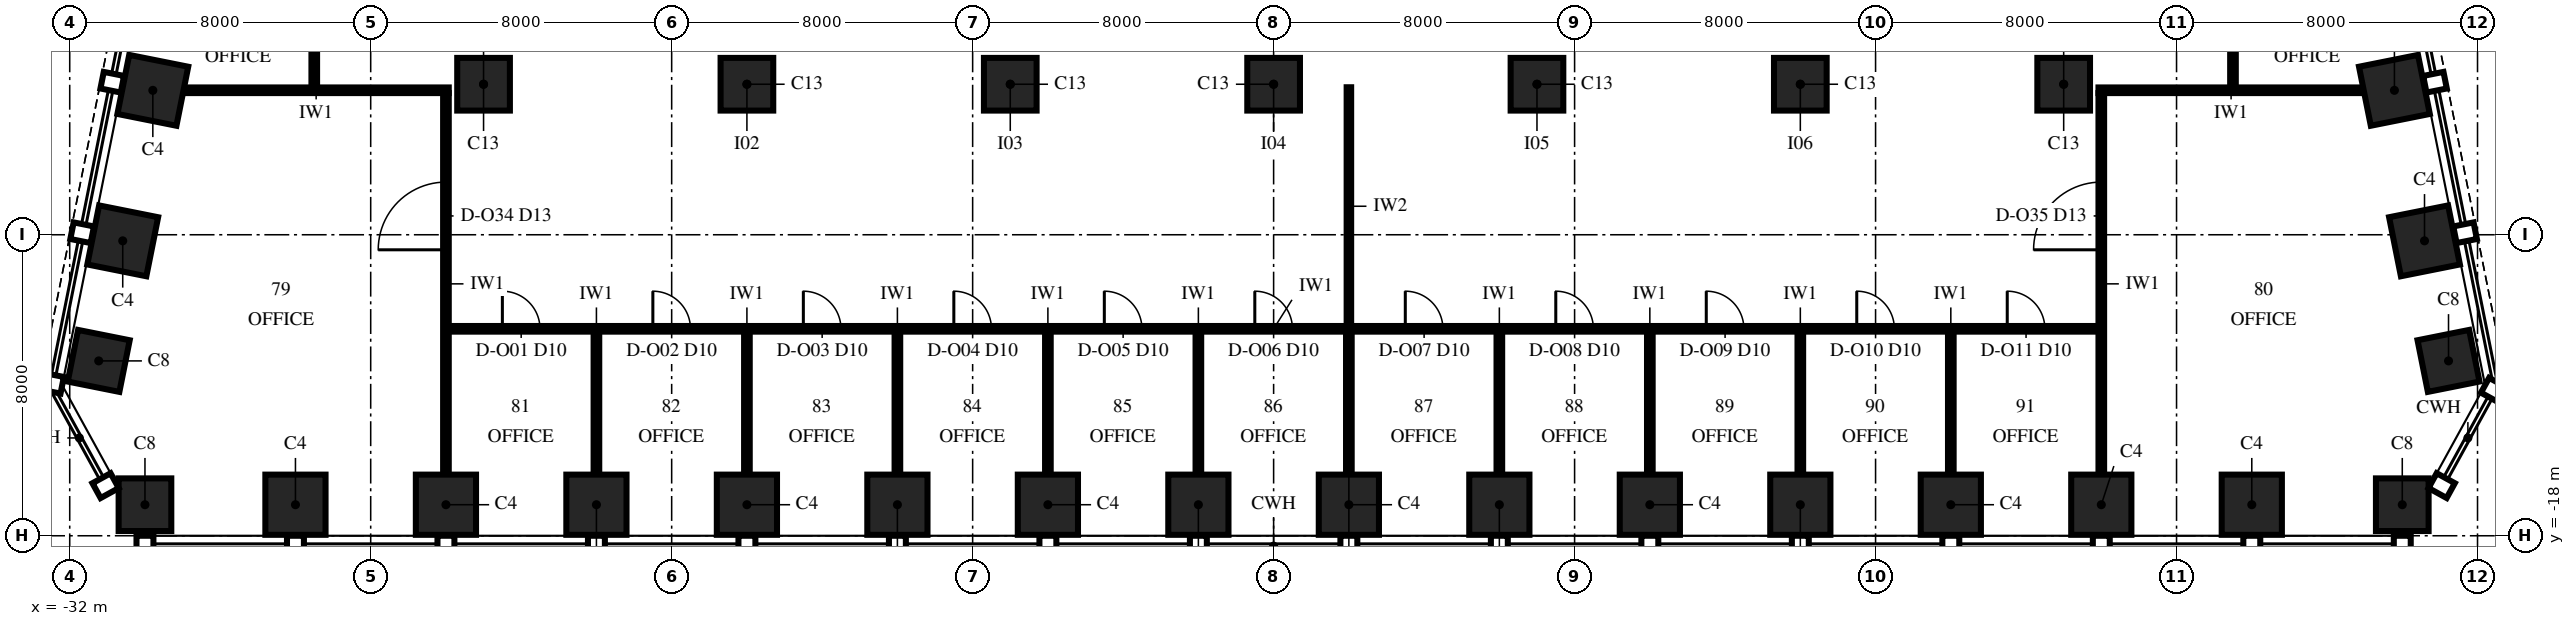
"""IFC4 building model, lengths in metres.
Left out: names, types, materials, properties, quantities, classifications, styles, units other than length and angle.
Written with IfcOpenShell. Run it as: python <this file> out.ifc"""

import sys

from ifc_helpers import new_model, si_unit, direction, frame, frame_2d, origin, origin_2d, place, context, subcontext, project, spatial, rectangle, extrude, element, fill, save


model = new_model("IFC4")
c1 = context("Model", 3, precision=1e-05, world=origin(), true_north=direction((0.0, 1.0)))
c2 = subcontext(c1, "Body", "Model", "MODEL_VIEW")
j1 = project(units=[si_unit("LENGTHUNIT", "METRE"), si_unit("PLANEANGLEUNIT", "RADIAN")], contexts=[c1])
p1 = place(None, origin())
s1 = spatial("IfcSite", under=j1, at=p1, CompositionType="ELEMENT")
p2 = place(p1, origin())
s2 = spatial("IfcBuilding", under=s1, at=p2, CompositionType="ELEMENT")
p3 = place(p2, frame((0.0, 0.0, 202.0)))
s3 = spatial("IfcBuildingStorey", under=s2, at=p3, CompositionType="ELEMENT", Elevation=202.0)
p4 = place(p3, frame((-30.0, -17.175, 0.0), z_axis=(0.0, 0.0, 1.0), x_axis=(1.0, 0.0, 0.0)))
e1 = element("IfcColumn", 1, at=p4, inside=s3, PredefinedType="COLUMN", context=c2, shape_type="SweptSolid", body=[
    extrude(rectangle(XDim=1.4, YDim=1.4, at=origin_2d()), origin(), (0.0, 0.0, 1.0), 4.0),
])
for number, where, z_axis, x_axis in (
    (2, (-26.0, -17.175, 0.0), (0.0, 0.0, 1.0), (1.0, 0.0, 0.0)),
    (3, (-22.0, -17.175, 0.0), (0.0, 0.0, 1.0), (1.0, 0.0, 0.0)),
    (4, (-18.0, -17.175, 0.0), (0.0, 0.0, 1.0), (1.0, 0.0, 0.0)),
    (5, (-14.0, -17.175, 0.0), (0.0, 0.0, 1.0), (1.0, 0.0, 0.0)),
    (6, (-10.0, -17.175, 0.0), (0.0, 0.0, 1.0), (1.0, 0.0, 0.0)),
    (7, (-6.0, -17.175, 0.0), (0.0, 0.0, 1.0), (1.0, 0.0, 0.0)),
    (8, (-2.0, -17.175, 0.0), (0.0, 0.0, 1.0), (1.0, 0.0, 0.0)),
    (9, (2.0, -17.175, 0.0), (0.0, 0.0, 1.0), (1.0, 0.0, 0.0)),
    (10, (6.0, -17.175, 0.0), (0.0, 0.0, 1.0), (1.0, 0.0, 0.0)),
    (11, (10.0, -17.175, 0.0), (0.0, 0.0, 1.0), (1.0, 0.0, 0.0)),
    (12, (14.0, -17.175, 0.0), (0.0, 0.0, 1.0), (1.0, 0.0, 0.0)),
    (13, (18.0, -17.175, 0.0), (0.0, 0.0, 1.0), (1.0, 0.0, 0.0)),
    (14, (22.0, -17.175, 0.0), (0.0, 0.0, 1.0), (1.0, 0.0, 0.0)),
    (15, (26.0, -17.175, 0.0), (0.0, 0.0, 1.0), (1.0, 0.0, 0.0)),
):
    element("IfcColumn", number, at=place(p3, frame(where, z_axis=z_axis, x_axis=x_axis)), inside=s3, PredefinedType="COLUMN", context=c2, shape_type="SweptSolid", body=[
        extrude(rectangle(XDim=1.6, YDim=1.6, at=origin_2d()), origin(), (0.0, 0.0, 1.0), 4.0),
    ])
for number, where, z_axis, x_axis in (
    (16, (30.0, -17.175, 0.0), (0.0, 0.0, 1.0), (1.0, 0.0, 0.0)),
    (17, (31.229, -13.353, 0.0), (0.0, 0.0, 1.0), (-0.196, 0.981, 0.0)),
):
    element("IfcColumn", number, at=place(p3, frame(where, z_axis=z_axis, x_axis=x_axis)), inside=s3, PredefinedType="COLUMN", context=c2, shape_type="SweptSolid", body=[
        extrude(rectangle(XDim=1.4, YDim=1.4, at=origin_2d()), origin(), (0.0, 0.0, 1.0), 4.0),
    ])
for number, where, z_axis, x_axis in (
    (18, (30.591, -10.162, 0.0), (0.0, 0.0, 1.0), (-0.196, 0.981, 0.0)),
    (19, (29.791, -6.162, 0.0), (0.0, 0.0, 1.0), (-0.196, 0.981, 0.0)),
    (20, (-29.791, -6.162, 0.0), (0.0, 0.0, 1.0), (-0.196, -0.981, 0.0)),
    (21, (-30.591, -10.162, 0.0), (0.0, 0.0, 1.0), (-0.196, -0.981, 0.0)),
):
    element("IfcColumn", number, at=place(p3, frame(where, z_axis=z_axis, x_axis=x_axis)), inside=s3, PredefinedType="COLUMN", context=c2, shape_type="SweptSolid", body=[
        extrude(rectangle(XDim=1.6, YDim=1.6, at=origin_2d()), origin(), (0.0, 0.0, 1.0), 4.0),
    ])
for number, where, z_axis, x_axis in (
    (22, (-31.229, -13.353, 0.0), (0.0, 0.0, 1.0), (-0.196, -0.981, 0.0)),
    (23, (-21.0, -6.0, 0.0), (0.0, 0.0, 1.0), (1.0, 0.0, 0.0)),
    (24, (-14.0, -6.0, 0.0), (0.0, 0.0, 1.0), (1.0, 0.0, 0.0)),
    (25, (-7.0, -6.0, 0.0), (0.0, 0.0, 1.0), (1.0, 0.0, 0.0)),
    (26, (0.0, -6.0, 0.0), (0.0, 0.0, 1.0), (1.0, 0.0, 0.0)),
    (27, (7.0, -6.0, 0.0), (0.0, 0.0, 1.0), (1.0, 0.0, 0.0)),
    (28, (14.0, -6.0, 0.0), (0.0, 0.0, 1.0), (1.0, 0.0, 0.0)),
    (29, (21.0, -6.0, 0.0), (0.0, 0.0, 1.0), (1.0, 0.0, 0.0)),
):
    element("IfcColumn", number, at=place(p3, frame(where, z_axis=z_axis, x_axis=x_axis)), inside=s3, PredefinedType="COLUMN", context=c2, shape_type="SweptSolid", body=[
        extrude(rectangle(XDim=1.4, YDim=1.4, at=origin_2d()), origin(), (0.0, 0.0, 1.0), 4.0),
    ])
p5 = place(p3, frame((-21.925, -12.5, 0.0), z_axis=(0.0, 0.0, 1.0), x_axis=(1.0, 0.0, 0.0)))
e30 = element("IfcWall", 30, at=p5, inside=s3, PredefinedType="PARTITIONING", context=c2, shape_type="SweptSolid", body=[
    extrude(rectangle(XDim=43.85, YDim=0.15, at=frame_2d((21.925, 0.0))), origin(), (0.0, 0.0, 1.0), 3.25),
])
p6 = place(p5, frame((1.425, 0.0, 0.0)))
e31 = element("IfcOpeningElement", 31, at=p6, cuts=e30, PredefinedType="OPENING", context=c2, shape_type="SweptSolid", body=[
    extrude(rectangle(XDim=1.0, YDim=2.3, at=frame_2d((0.5, 1.15))), frame((0.0, 0.09, 0.0), z_axis=(0.0, -1.0, 0.0), x_axis=(1.0, 0.0, 0.0)), (0.0, 0.0, 1.0), 0.18),
])
p7 = place(p5, frame((5.425, 0.0, 0.0)))
e32 = element("IfcOpeningElement", 32, at=p7, cuts=e30, PredefinedType="OPENING", context=c2, shape_type="SweptSolid", body=[
    extrude(rectangle(XDim=1.0, YDim=2.3, at=frame_2d((0.5, 1.15))), frame((0.0, 0.09, 0.0), z_axis=(0.0, -1.0, 0.0), x_axis=(1.0, 0.0, 0.0)), (0.0, 0.0, 1.0), 0.18),
])
p8 = place(p5, frame((9.425, 0.0, 0.0)))
e33 = element("IfcOpeningElement", 33, at=p8, cuts=e30, PredefinedType="OPENING", context=c2, shape_type="SweptSolid", body=[
    extrude(rectangle(XDim=1.0, YDim=2.3, at=frame_2d((0.5, 1.15))), frame((0.0, 0.09, 0.0), z_axis=(0.0, -1.0, 0.0), x_axis=(1.0, 0.0, 0.0)), (0.0, 0.0, 1.0), 0.18),
])
p9 = place(p5, frame((13.425, 0.0, 0.0)))
e34 = element("IfcOpeningElement", 34, at=p9, cuts=e30, PredefinedType="OPENING", context=c2, shape_type="SweptSolid", body=[
    extrude(rectangle(XDim=1.0, YDim=2.3, at=frame_2d((0.5, 1.15))), frame((0.0, 0.09, 0.0), z_axis=(0.0, -1.0, 0.0), x_axis=(1.0, 0.0, 0.0)), (0.0, 0.0, 1.0), 0.18),
])
p10 = place(p5, frame((17.425, 0.0, 0.0)))
e35 = element("IfcOpeningElement", 35, at=p10, cuts=e30, PredefinedType="OPENING", context=c2, shape_type="SweptSolid", body=[
    extrude(rectangle(XDim=1.0, YDim=2.3, at=frame_2d((0.5, 1.15))), frame((0.0, 0.09, 0.0), z_axis=(0.0, -1.0, 0.0), x_axis=(1.0, 0.0, 0.0)), (0.0, 0.0, 1.0), 0.18),
])
p11 = place(p5, frame((21.425, 0.0, 0.0)))
e36 = element("IfcOpeningElement", 36, at=p11, cuts=e30, PredefinedType="OPENING", context=c2, shape_type="SweptSolid", body=[
    extrude(rectangle(XDim=1.0, YDim=2.3, at=frame_2d((0.5, 1.15))), frame((0.0, 0.09, 0.0), z_axis=(0.0, -1.0, 0.0), x_axis=(1.0, 0.0, 0.0)), (0.0, 0.0, 1.0), 0.18),
])
p12 = place(p5, frame((25.425, 0.0, 0.0)))
e37 = element("IfcOpeningElement", 37, at=p12, cuts=e30, PredefinedType="OPENING", context=c2, shape_type="SweptSolid", body=[
    extrude(rectangle(XDim=1.0, YDim=2.3, at=frame_2d((0.5, 1.15))), frame((0.0, 0.09, 0.0), z_axis=(0.0, -1.0, 0.0), x_axis=(1.0, 0.0, 0.0)), (0.0, 0.0, 1.0), 0.18),
])
p13 = place(p5, frame((29.425, 0.0, 0.0)))
e38 = element("IfcOpeningElement", 38, at=p13, cuts=e30, PredefinedType="OPENING", context=c2, shape_type="SweptSolid", body=[
    extrude(rectangle(XDim=1.0, YDim=2.3, at=frame_2d((0.5, 1.15))), frame((0.0, 0.09, 0.0), z_axis=(0.0, -1.0, 0.0), x_axis=(1.0, 0.0, 0.0)), (0.0, 0.0, 1.0), 0.18),
])
p14 = place(p5, frame((33.425, 0.0, 0.0)))
e39 = element("IfcOpeningElement", 39, at=p14, cuts=e30, PredefinedType="OPENING", context=c2, shape_type="SweptSolid", body=[
    extrude(rectangle(XDim=1.0, YDim=2.3, at=frame_2d((0.5, 1.15))), frame((0.0, 0.09, 0.0), z_axis=(0.0, -1.0, 0.0), x_axis=(1.0, 0.0, 0.0)), (0.0, 0.0, 1.0), 0.18),
])
p15 = place(p5, frame((37.425, 0.0, 0.0)))
e40 = element("IfcOpeningElement", 40, at=p15, cuts=e30, PredefinedType="OPENING", context=c2, shape_type="SweptSolid", body=[
    extrude(rectangle(XDim=1.0, YDim=2.3, at=frame_2d((0.5, 1.15))), frame((0.0, 0.09, 0.0), z_axis=(0.0, -1.0, 0.0), x_axis=(1.0, 0.0, 0.0)), (0.0, 0.0, 1.0), 0.18),
])
p16 = place(p5, frame((41.425, 0.0, 0.0)))
e41 = element("IfcOpeningElement", 41, at=p16, cuts=e30, PredefinedType="OPENING", context=c2, shape_type="SweptSolid", body=[
    extrude(rectangle(XDim=1.0, YDim=2.3, at=frame_2d((0.5, 1.15))), frame((0.0, 0.09, 0.0), z_axis=(0.0, -1.0, 0.0), x_axis=(1.0, 0.0, 0.0)), (0.0, 0.0, 1.0), 0.18),
])
for number, where, z_axis, x_axis in (
    (42, (-28.975, -6.16, 0.0), (0.0, 0.0, 1.0), (1.0, 0.0, 0.0)),
    (43, (21.925, -6.16, 0.0), (0.0, 0.0, 1.0), (1.0, 0.0, 0.0)),
):
    element("IfcWall", number, at=place(p3, frame(where, z_axis=z_axis, x_axis=x_axis)), inside=s3, PredefinedType="PARTITIONING", context=c2, shape_type="SweptSolid", body=[
        extrude(rectangle(XDim=7.05, YDim=0.15, at=frame_2d((3.525, 0.0))), origin(), (0.0, 0.0, 1.0), 2.842),
    ])
p17 = place(p3, frame((-25.5, -6.085, 0.0), z_axis=(0.0, 0.0, 1.0), x_axis=(0.0, 1.0, 0.0)))
e44 = element("IfcWall", 44, at=p17, inside=s3, PredefinedType="PARTITIONING", context=c2, shape_type="SweptSolid", body=[
    extrude(rectangle(XDim=3.85, YDim=0.15, at=frame_2d((1.925, 0.0))), origin(), (0.0, 0.0, 1.0), 2.842),
])
p18 = place(p17, frame((1.425, 0.0, 0.0)))
e45 = element("IfcOpeningElement", 45, at=p18, cuts=e44, PredefinedType="OPENING", context=c2, shape_type="SweptSolid", body=[
    extrude(rectangle(XDim=1.0, YDim=2.3, at=frame_2d((0.5, 1.15))), frame((0.0, 0.09, 0.0), z_axis=(0.0, -1.0, 0.0), x_axis=(1.0, 0.0, 0.0)), (0.0, 0.0, 1.0), 0.18),
])
p19 = place(p3, frame((-22.0, -16.375, 0.0), z_axis=(0.0, 0.0, 1.0), x_axis=(0.0, 1.0, 0.0)))
e46 = element("IfcWall", 46, at=p19, inside=s3, PredefinedType="PARTITIONING", context=c2, shape_type="SweptSolid", body=[
    extrude(rectangle(XDim=10.14, YDim=0.15, at=frame_2d((5.07, 0.0))), origin(), (0.0, 0.0, 1.0), 3.25),
])
p20 = place(p19, frame((5.975, 0.0, 0.0)))
e47 = element("IfcOpeningElement", 47, at=p20, cuts=e46, PredefinedType="OPENING", context=c2, shape_type="SweptSolid", body=[
    extrude(rectangle(XDim=1.8, YDim=2.4, at=frame_2d((0.9, 1.2))), frame((0.0, 0.09, 0.0), z_axis=(0.0, -1.0, 0.0), x_axis=(1.0, 0.0, 0.0)), (0.0, 0.0, 1.0), 0.18),
])
for number, where, z_axis, x_axis in (
    (48, (-18.0, -16.375, 0.0), (0.0, 0.0, 1.0), (0.0, 1.0, 0.0)),
    (49, (-14.0, -16.375, 0.0), (0.0, 0.0, 1.0), (0.0, 1.0, 0.0)),
    (50, (-10.0, -16.375, 0.0), (0.0, 0.0, 1.0), (0.0, 1.0, 0.0)),
    (51, (-6.0, -16.375, 0.0), (0.0, 0.0, 1.0), (0.0, 1.0, 0.0)),
    (52, (-2.0, -16.375, 0.0), (0.0, 0.0, 1.0), (0.0, 1.0, 0.0)),
    (53, (2.0, -16.375, 0.0), (0.0, 0.0, 1.0), (0.0, 1.0, 0.0)),
    (54, (6.0, -16.375, 0.0), (0.0, 0.0, 1.0), (0.0, 1.0, 0.0)),
    (55, (10.0, -16.375, 0.0), (0.0, 0.0, 1.0), (0.0, 1.0, 0.0)),
    (56, (14.0, -16.375, 0.0), (0.0, 0.0, 1.0), (0.0, 1.0, 0.0)),
    (57, (18.0, -16.375, 0.0), (0.0, 0.0, 1.0), (0.0, 1.0, 0.0)),
):
    element("IfcWall", number, at=place(p3, frame(where, z_axis=z_axis, x_axis=x_axis)), inside=s3, PredefinedType="PARTITIONING", context=c2, shape_type="SweptSolid", body=[
        extrude(rectangle(XDim=3.8, YDim=0.15, at=frame_2d((1.9, 0.0))), origin(), (0.0, 0.0, 1.0), 3.25),
    ])
p21 = place(p3, frame((22.0, -16.375, 0.0), z_axis=(0.0, 0.0, 1.0), x_axis=(0.0, 1.0, 0.0)))
e58 = element("IfcWall", 58, at=p21, inside=s3, PredefinedType="PARTITIONING", context=c2, shape_type="SweptSolid", body=[
    extrude(rectangle(XDim=10.14, YDim=0.15, at=frame_2d((5.07, 0.0))), origin(), (0.0, 0.0, 1.0), 3.25),
])
p22 = place(p21, frame((5.975, 0.0, 0.0)))
e59 = element("IfcOpeningElement", 59, at=p22, cuts=e58, PredefinedType="OPENING", context=c2, shape_type="SweptSolid", body=[
    extrude(rectangle(XDim=1.8, YDim=2.4, at=frame_2d((0.9, 1.2))), frame((0.0, 0.09, 0.0), z_axis=(0.0, -1.0, 0.0), x_axis=(1.0, 0.0, 0.0)), (0.0, 0.0, 1.0), 0.18),
])
p23 = place(p3, frame((25.5, -6.085, 0.0), z_axis=(0.0, 0.0, 1.0), x_axis=(0.0, 1.0, 0.0)))
e60 = element("IfcWall", 60, at=p23, inside=s3, PredefinedType="PARTITIONING", context=c2, shape_type="SweptSolid", body=[
    extrude(rectangle(XDim=3.85, YDim=0.15, at=frame_2d((1.925, 0.0))), origin(), (0.0, 0.0, 1.0), 2.842),
])
p24 = place(p23, frame((1.425, 0.0, 0.0)))
e61 = element("IfcOpeningElement", 61, at=p24, cuts=e60, PredefinedType="OPENING", context=c2, shape_type="SweptSolid", body=[
    extrude(rectangle(XDim=1.0, YDim=2.3, at=frame_2d((0.5, 1.15))), frame((0.0, 0.09, 0.0), z_axis=(0.0, -1.0, 0.0), x_axis=(1.0, 0.0, 0.0)), (0.0, 0.0, 1.0), 0.18),
])
p25 = place(p3, frame((2.001, -12.405, 0.0), z_axis=(0.0, 0.0, 1.0), x_axis=(0.0, 1.0, 0.0)))
e62 = element("IfcWall", 62, at=p25, inside=s3, PredefinedType="PARTITIONING", context=c2, shape_type="SweptSolid", body=[
    extrude(rectangle(XDim=6.325, YDim=0.12, at=frame_2d((3.163, 0.0))), origin(), (0.0, 0.0, 1.0), 2.842),
])
p26 = place(p6, origin())
e63 = element("IfcDoor", 63, at=p26, inside=s3, OperationType="SINGLE_SWING_LEFT", PredefinedType="DOOR", context=c2, shape_type="SweptSolid", body=[
    extrude(rectangle(XDim=1.0, YDim=2.3, at=frame_2d((0.5, 1.15))), frame((0.0, 0.075, 0.0), z_axis=(0.0, -1.0, 0.0), x_axis=(1.0, 0.0, 0.0)), (0.0, 0.0, 1.0), 0.149),
])
fill(e31, e63)
p27 = place(p7, origin())
e64 = element("IfcDoor", 64, at=p27, inside=s3, OperationType="SINGLE_SWING_LEFT", PredefinedType="DOOR", context=c2, shape_type="SweptSolid", body=[
    extrude(rectangle(XDim=1.0, YDim=2.3, at=frame_2d((0.5, 1.15))), frame((0.0, 0.075, 0.0), z_axis=(0.0, -1.0, 0.0), x_axis=(1.0, 0.0, 0.0)), (0.0, 0.0, 1.0), 0.149),
])
fill(e32, e64)
p28 = place(p8, origin())
e65 = element("IfcDoor", 65, at=p28, inside=s3, OperationType="SINGLE_SWING_LEFT", PredefinedType="DOOR", context=c2, shape_type="SweptSolid", body=[
    extrude(rectangle(XDim=1.0, YDim=2.3, at=frame_2d((0.5, 1.15))), frame((0.0, 0.075, 0.0), z_axis=(0.0, -1.0, 0.0), x_axis=(1.0, 0.0, 0.0)), (0.0, 0.0, 1.0), 0.149),
])
fill(e33, e65)
p29 = place(p9, origin())
e66 = element("IfcDoor", 66, at=p29, inside=s3, OperationType="SINGLE_SWING_LEFT", PredefinedType="DOOR", context=c2, shape_type="SweptSolid", body=[
    extrude(rectangle(XDim=1.0, YDim=2.3, at=frame_2d((0.5, 1.15))), frame((0.0, 0.075, 0.0), z_axis=(0.0, -1.0, 0.0), x_axis=(1.0, 0.0, 0.0)), (0.0, 0.0, 1.0), 0.149),
])
fill(e34, e66)
p30 = place(p10, origin())
e67 = element("IfcDoor", 67, at=p30, inside=s3, OperationType="SINGLE_SWING_LEFT", PredefinedType="DOOR", context=c2, shape_type="SweptSolid", body=[
    extrude(rectangle(XDim=1.0, YDim=2.3, at=frame_2d((0.5, 1.15))), frame((0.0, 0.075, 0.0), z_axis=(0.0, -1.0, 0.0), x_axis=(1.0, 0.0, 0.0)), (0.0, 0.0, 1.0), 0.149),
])
fill(e35, e67)
p31 = place(p11, origin())
e68 = element("IfcDoor", 68, at=p31, inside=s3, OperationType="SINGLE_SWING_LEFT", PredefinedType="DOOR", context=c2, shape_type="SweptSolid", body=[
    extrude(rectangle(XDim=1.0, YDim=2.3, at=frame_2d((0.5, 1.15))), frame((0.0, 0.075, 0.0), z_axis=(0.0, -1.0, 0.0), x_axis=(1.0, 0.0, 0.0)), (0.0, 0.0, 1.0), 0.149),
])
fill(e36, e68)
p32 = place(p12, origin())
e69 = element("IfcDoor", 69, at=p32, inside=s3, OperationType="SINGLE_SWING_LEFT", PredefinedType="DOOR", context=c2, shape_type="SweptSolid", body=[
    extrude(rectangle(XDim=1.0, YDim=2.3, at=frame_2d((0.5, 1.15))), frame((0.0, 0.075, 0.0), z_axis=(0.0, -1.0, 0.0), x_axis=(1.0, 0.0, 0.0)), (0.0, 0.0, 1.0), 0.149),
])
fill(e37, e69)
p33 = place(p13, origin())
e70 = element("IfcDoor", 70, at=p33, inside=s3, OperationType="SINGLE_SWING_LEFT", PredefinedType="DOOR", context=c2, shape_type="SweptSolid", body=[
    extrude(rectangle(XDim=1.0, YDim=2.3, at=frame_2d((0.5, 1.15))), frame((0.0, 0.075, 0.0), z_axis=(0.0, -1.0, 0.0), x_axis=(1.0, 0.0, 0.0)), (0.0, 0.0, 1.0), 0.149),
])
fill(e38, e70)
p34 = place(p14, origin())
e71 = element("IfcDoor", 71, at=p34, inside=s3, OperationType="SINGLE_SWING_LEFT", PredefinedType="DOOR", context=c2, shape_type="SweptSolid", body=[
    extrude(rectangle(XDim=1.0, YDim=2.3, at=frame_2d((0.5, 1.15))), frame((0.0, 0.075, 0.0), z_axis=(0.0, -1.0, 0.0), x_axis=(1.0, 0.0, 0.0)), (0.0, 0.0, 1.0), 0.149),
])
fill(e39, e71)
p35 = place(p15, origin())
e72 = element("IfcDoor", 72, at=p35, inside=s3, OperationType="SINGLE_SWING_LEFT", PredefinedType="DOOR", context=c2, shape_type="SweptSolid", body=[
    extrude(rectangle(XDim=1.0, YDim=2.3, at=frame_2d((0.5, 1.15))), frame((0.0, 0.075, 0.0), z_axis=(0.0, -1.0, 0.0), x_axis=(1.0, 0.0, 0.0)), (0.0, 0.0, 1.0), 0.149),
])
fill(e40, e72)
p36 = place(p16, origin())
e73 = element("IfcDoor", 73, at=p36, inside=s3, OperationType="SINGLE_SWING_LEFT", PredefinedType="DOOR", context=c2, shape_type="SweptSolid", body=[
    extrude(rectangle(XDim=1.0, YDim=2.3, at=frame_2d((0.5, 1.15))), frame((0.0, 0.075, 0.0), z_axis=(0.0, -1.0, 0.0), x_axis=(1.0, 0.0, 0.0)), (0.0, 0.0, 1.0), 0.149),
])
fill(e41, e73)
p37 = place(p20, origin())
e74 = element("IfcDoor", 74, at=p37, inside=s3, OperationType="DOUBLE_DOOR_SINGLE_SWING", PredefinedType="DOOR", context=c2, shape_type="SweptSolid", body=[
    extrude(rectangle(XDim=1.8, YDim=2.4, at=frame_2d((0.9, 1.2))), frame((0.0, 0.075, 0.0), z_axis=(0.0, -1.0, 0.0), x_axis=(1.0, 0.0, 0.0)), (0.0, 0.0, 1.0), 0.149),
])
fill(e47, e74)
p38 = place(p22, origin())
e75 = element("IfcDoor", 75, at=p38, inside=s3, OperationType="DOUBLE_DOOR_SINGLE_SWING", PredefinedType="DOOR", context=c2, shape_type="SweptSolid", body=[
    extrude(rectangle(XDim=1.8, YDim=2.4, at=frame_2d((0.9, 1.2))), frame((0.0, 0.075, 0.0), z_axis=(0.0, -1.0, 0.0), x_axis=(1.0, 0.0, 0.0)), (0.0, 0.0, 1.0), 0.149),
])
fill(e59, e75)
save(model, sys.argv[1])
